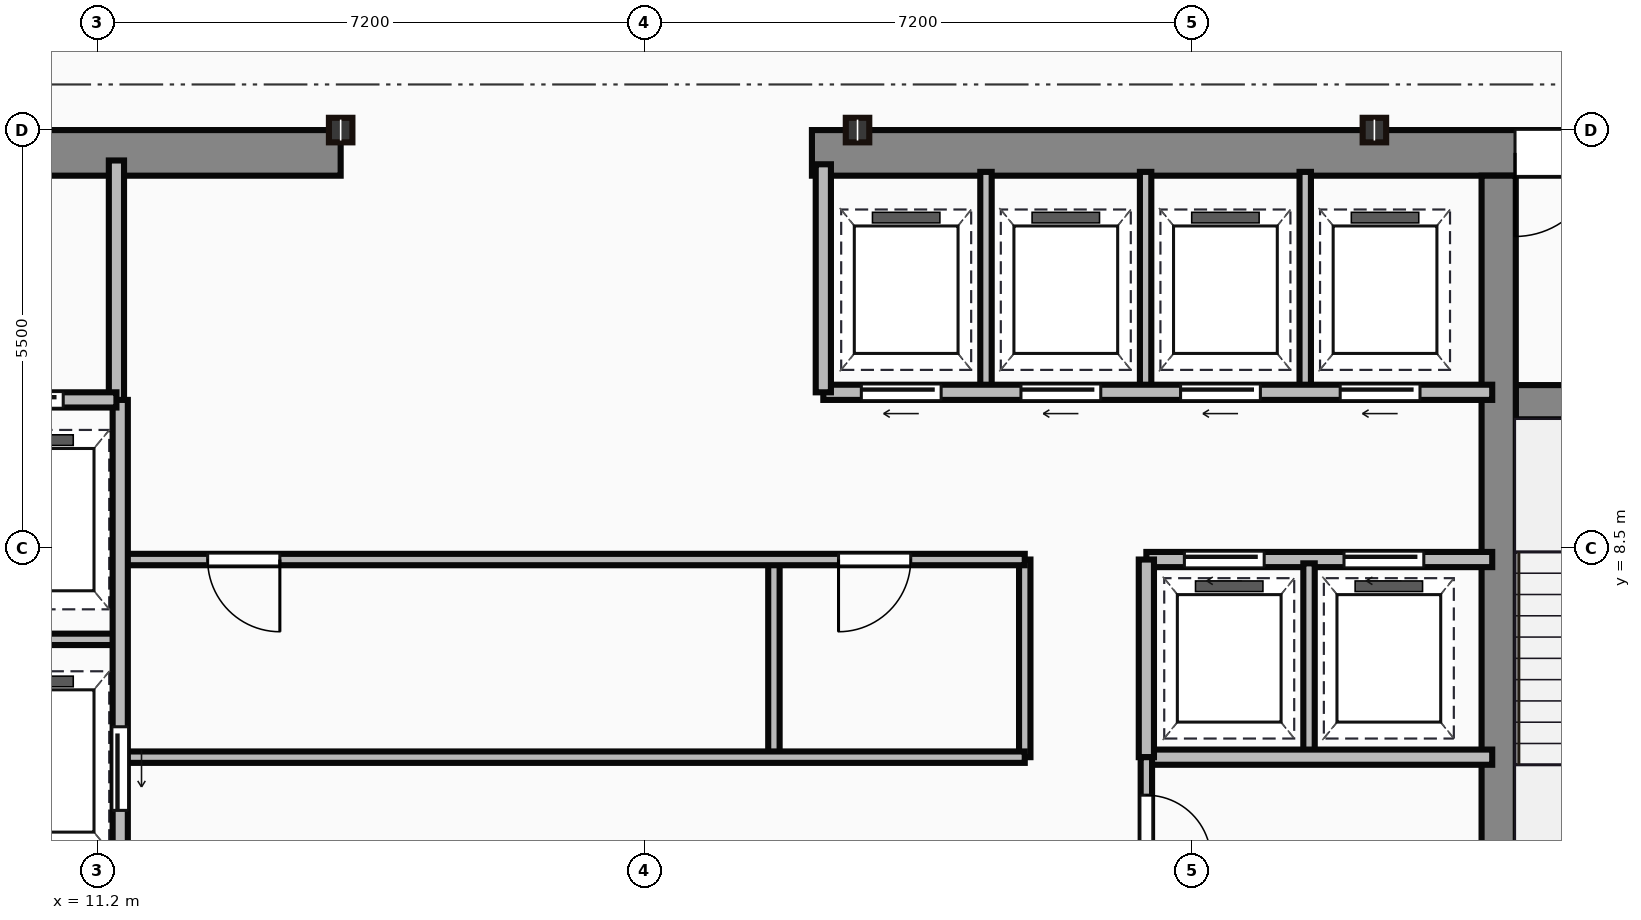
"""IFC4 building model, lengths in metres.
Left out: names, types, materials, properties, quantities, classifications, styles, units other than length and angle.
Written with IfcOpenShell. Run it as: python <this file> out.ifc"""

import sys

from ifc_helpers import new_model, si_unit, direction, frame, frame_2d, origin, origin_2d, place, context, subcontext, project, spatial, rectangle, i_section, extrude, source, transform, mapped, element, fill, save


model = new_model("IFC4")
c1 = context("Model", 3, precision=1e-05, world=origin(), true_north=direction((0.0, 1.0)))
c2 = subcontext(c1, "Body", "Model", "MODEL_VIEW")
j1 = project(units=[si_unit("LENGTHUNIT", "METRE"), si_unit("PLANEANGLEUNIT", "RADIAN")], contexts=[c1])
p1 = place(None, origin())
s1 = spatial("IfcSite", under=j1, at=p1, CompositionType="ELEMENT")
p2 = place(p1, origin())
s2 = spatial("IfcBuilding", under=s1, at=p2, CompositionType="ELEMENT")
p3 = place(p2, frame((0.0, 0.0, 273.4)))
s3 = spatial("IfcBuildingStorey", under=s2, at=p3, CompositionType="ELEMENT", Elevation=273.4)
m1 = source(origin(), c2, "Body", "SweptSolid", [
    extrude(rectangle(XDim=9.1, YDim=0.6, at=frame_2d((4.55, 0.0))), origin(), (0.0, 0.0, 1.0), 3.65),
])
p4 = place(p3, frame((5.3, 13.7, 0.0), z_axis=(0.0, 0.0, 1.0), x_axis=(1.0, 0.0, 0.0)))
e1 = element("IfcWall", 1, at=p4, inside=s3, PredefinedType="SHEAR", context=c2, shape_type="MappedRepresentation", body=[
    mapped(m1, transform((0.0, 0.0, 0.0))),
])
p5 = place(p4, frame((4.1, 0.0, 0.0)))
e2 = element("IfcOpeningElement", 2, at=p5, cuts=e1, PredefinedType="OPENING", context=c2, shape_type="SweptSolid", body=[
    extrude(rectangle(XDim=1.1, YDim=2.15, at=frame_2d((0.55, 1.075))), frame((0.0, 0.31, 0.0), z_axis=(0.0, -1.0, 0.0), x_axis=(1.0, 0.0, 0.0)), (0.0, 0.0, 1.0), 0.62),
])
m2 = source(origin(), c2, "Body", "SweptSolid", [
    extrude(rectangle(XDim=12.6, YDim=0.6, at=frame_2d((6.3, 0.0))), origin(), (0.0, 0.0, 1.0), 3.65),
])
p6 = place(p3, frame((20.6, 13.7, 0.0), z_axis=(0.0, 0.0, 1.0), x_axis=(1.0, 0.0, 0.0)))
e3 = element("IfcWall", 3, at=p6, inside=s3, PredefinedType="SHEAR", context=c2, shape_type="MappedRepresentation", body=[
    mapped(m2, transform((0.0, 0.0, 0.0))),
])
p7 = place(p6, frame((9.25, 0.0, 0.0)))
e4 = element("IfcOpeningElement", 4, at=p7, cuts=e3, PredefinedType="OPENING", context=c2, shape_type="SweptSolid", body=[
    extrude(rectangle(XDim=1.1, YDim=2.15, at=frame_2d((0.55, 1.075))), frame((0.0, 0.31, 0.0), z_axis=(0.0, -1.0, 0.0), x_axis=(1.0, 0.0, 0.0)), (0.0, 0.0, 1.0), 0.62),
])
m3 = source(origin(), c2, "Body", "SweptSolid", [
    extrude(rectangle(XDim=12.5, YDim=0.45, at=frame_2d((6.25, 0.0))), origin(), (0.0, 0.0, 1.0), 3.65),
])
p8 = place(p3, frame((29.635, 0.9, 0.0), z_axis=(0.0, 0.0, 1.0), x_axis=(0.0, 1.0, 0.0)))
e5 = element("IfcWall", 5, at=p8, inside=s3, PredefinedType="SHEAR", context=c2, shape_type="MappedRepresentation", body=[
    mapped(m3, transform((0.0, 0.0, 0.0))),
])
m4 = source(origin(), c2, "Body", "SweptSolid", [
    extrude(rectangle(XDim=3.39, YDim=0.45, at=frame_2d((1.695, 0.0))), origin(), (0.0, 0.0, 1.0), 3.65),
])
p9 = place(p3, frame((29.86, 10.42, 0.0), z_axis=(0.0, 0.0, 1.0), x_axis=(1.0, 0.0, 0.0)))
e6 = element("IfcWall", 6, at=p9, inside=s3, PredefinedType="SHEAR", context=c2, shape_type="MappedRepresentation", body=[
    mapped(m4, transform((0.0, 0.0, 0.0))),
])
p10 = place(p9, frame((1.1, 0.0, 0.0)))
e7 = element("IfcOpeningElement", 7, at=p10, cuts=e6, PredefinedType="OPENING", context=c2, shape_type="SweptSolid", body=[
    extrude(rectangle(XDim=1.1, YDim=2.15, at=frame_2d((0.55, 1.075))), frame((0.0, 0.235, 0.0), z_axis=(0.0, -1.0, 0.0), x_axis=(1.0, 0.0, 0.0)), (0.0, 0.0, 1.0), 0.47),
])
m5 = source(origin(), c2, "Body", "SweptSolid", [
    extrude(i_section(OverallWidth=0.309, OverallDepth=0.323, WebThickness=0.014, FlangeThickness=0.023, at=origin_2d()), origin(), (0.0, 0.0, 1.0), 3.65),
])
for number, where, z_axis, x_axis in (
    (8, (14.4, 14.0, 0.0), (0.0, 0.0, 1.0), (1.0, 0.0, 0.0)),
    (9, (21.2, 14.0, 0.0), (0.0, 0.0, 1.0), (1.0, 0.0, 0.0)),
    (10, (28.0, 14.0, 0.0), (0.0, 0.0, 1.0), (1.0, 0.0, 0.0)),
):
    element("IfcColumn", number, at=place(p3, frame(where, z_axis=z_axis, x_axis=x_axis)), inside=s3, PredefinedType="COLUMN", context=c2, shape_type="MappedRepresentation", body=[
        mapped(m5, transform((0.0, 0.0, 0.0))),
    ])
m6 = source(origin(), c2, "Body", "SweptSolid", [
    extrude(rectangle(XDim=3.18, YDim=0.2, at=frame_2d((1.59, 0.0))), origin(), (0.0, 0.0, 1.0), 3.4),
])
p11 = place(p3, frame((11.45, 10.42, 0.0), z_axis=(0.0, 0.0, 1.0), x_axis=(0.0, 1.0, 0.0)))
e11 = element("IfcWall", 11, at=p11, inside=s3, PredefinedType="PARTITIONING", context=c2, shape_type="MappedRepresentation", body=[
    mapped(m6, transform((0.0, 0.0, 0.0))),
])
m7 = source(origin(), c2, "Body", "SweptSolid", [
    extrude(rectangle(XDim=2.35, YDim=0.2, at=frame_2d((1.175, 0.0))), origin(), (0.0, 0.0, 1.0), 3.4),
])
p12 = place(p3, frame((9.1, 10.45, 0.0), z_axis=(0.0, 0.0, 1.0), x_axis=(1.0, 0.0, 0.0)))
e12 = element("IfcWall", 12, at=p12, inside=s3, PredefinedType="PARTITIONING", context=c2, shape_type="MappedRepresentation", body=[
    mapped(m7, transform((0.0, 0.0, 0.0))),
])
p13 = place(p12, frame((0.55, 0.0, 0.0)))
e13 = element("IfcOpeningElement", 13, at=p13, cuts=e12, PredefinedType="OPENING", context=c2, shape_type="SweptSolid", body=[
    extrude(rectangle(XDim=1.1, YDim=2.15, at=frame_2d((0.55, 1.075))), frame((0.0, 0.11, 0.0), z_axis=(0.0, -1.0, 0.0), x_axis=(1.0, 0.0, 0.0)), (0.0, 0.0, 1.0), 0.22),
])
m8 = source(origin(), c2, "Body", "SweptSolid", [
    extrude(rectangle(XDim=9.6, YDim=0.2, at=frame_2d((4.8, 0.0))), origin(), (0.0, 0.0, 1.0), 3.4),
])
p14 = place(p3, frame((11.5, 0.85, 0.0), z_axis=(0.0, 0.0, 1.0), x_axis=(0.0, 1.0, 0.0)))
e14 = element("IfcWall", 14, at=p14, inside=s3, PredefinedType="PARTITIONING", context=c2, shape_type="MappedRepresentation", body=[
    mapped(m8, transform((0.0, 0.0, 0.0))),
])
p15 = place(p14, frame((4.2, 0.0, 0.0)))
e15 = element("IfcOpeningElement", 15, at=p15, cuts=e14, PredefinedType="OPENING", context=c2, shape_type="SweptSolid", body=[
    extrude(rectangle(XDim=1.1, YDim=2.15, at=frame_2d((0.55, 1.075))), frame((0.0, 0.11, 0.0), z_axis=(0.0, -1.0, 0.0), x_axis=(1.0, 0.0, 0.0)), (0.0, 0.0, 1.0), 0.22),
])
p16 = place(p14, frame((0.9, 0.0, 0.0)))
e16 = element("IfcOpeningElement", 16, at=p16, cuts=e14, PredefinedType="OPENING", context=c2, shape_type="SweptSolid", body=[
    extrude(rectangle(XDim=1.2, YDim=2.15, at=frame_2d((0.6, 1.075))), frame((0.0, 0.11, 0.0), z_axis=(0.0, -1.0, 0.0), x_axis=(1.0, 0.0, 0.0)), (0.0, 0.0, 1.0), 0.22),
])
m9 = source(origin(), c2, "Body", "SweptSolid", [
    extrude(rectangle(XDim=2.4, YDim=0.15, at=frame_2d((1.2, 0.0))), origin(), (0.0, 0.0, 1.0), 3.4),
])
p17 = place(p3, frame((9.1, 7.3, 0.0), z_axis=(0.0, 0.0, 1.0), x_axis=(1.0, 0.0, 0.0)))
e17 = element("IfcWall", 17, at=p17, inside=s3, PredefinedType="PARTITIONING", context=c2, shape_type="MappedRepresentation", body=[
    mapped(m9, transform((0.0, 0.0, 0.0))),
])
m10 = source(origin(), c2, "Body", "SweptSolid", [
    extrude(rectangle(XDim=11.85, YDim=0.15, at=frame_2d((5.925, 0.0))), origin(), (0.0, 0.0, 1.0), 3.4),
])
p18 = place(p3, frame((11.55, 5.75, 0.0), z_axis=(0.0, 0.0, 1.0), x_axis=(1.0, 0.0, 0.0)))
e18 = element("IfcWall", 18, at=p18, inside=s3, PredefinedType="PARTITIONING", context=c2, shape_type="MappedRepresentation", body=[
    mapped(m10, transform((0.0, 0.0, 0.0))),
])
p19 = place(p3, frame((11.55, 8.35, 0.0), z_axis=(0.0, 0.0, 1.0), x_axis=(1.0, 0.0, 0.0)))
e19 = element("IfcWall", 19, at=p19, inside=s3, PredefinedType="PARTITIONING", context=c2, shape_type="MappedRepresentation", body=[
    mapped(m10, transform((0.0, 0.0, 0.0))),
])
p20 = place(p19, frame((1.1, 0.0, 0.0)))
e20 = element("IfcOpeningElement", 20, at=p20, cuts=e19, PredefinedType="OPENING", context=c2, shape_type="SweptSolid", body=[
    extrude(rectangle(XDim=0.95, YDim=2.15, at=frame_2d((0.475, 1.075))), frame((0.0, 0.085, 0.0), z_axis=(0.0, -1.0, 0.0), x_axis=(1.0, 0.0, 0.0)), (0.0, 0.0, 1.0), 0.17),
])
p21 = place(p19, frame((9.4, 0.0, 0.0)))
e21 = element("IfcOpeningElement", 21, at=p21, cuts=e19, PredefinedType="OPENING", context=c2, shape_type="SweptSolid", body=[
    extrude(rectangle(XDim=0.95, YDim=2.15, at=frame_2d((0.475, 1.075))), frame((0.0, 0.085, 0.0), z_axis=(0.0, -1.0, 0.0), x_axis=(1.0, 0.0, 0.0)), (0.0, 0.0, 1.0), 0.17),
])
m11 = source(origin(), c2, "Body", "SweptSolid", [
    extrude(rectangle(XDim=2.6, YDim=0.15, at=frame_2d((1.3, 0.0))), origin(), (0.0, 0.0, 1.0), 3.4),
])
p22 = place(p3, frame((23.4, 5.75, 0.0), z_axis=(0.0, 0.0, 1.0), x_axis=(0.0, 1.0, 0.0)))
e22 = element("IfcWall", 22, at=p22, inside=s3, PredefinedType="PARTITIONING", context=c2, shape_type="MappedRepresentation", body=[
    mapped(m11, transform((0.0, 0.0, 0.0))),
])
m12 = source(origin(), c2, "Body", "SweptSolid", [
    extrude(rectangle(XDim=2.5, YDim=0.15, at=frame_2d((1.25, 0.0))), origin(), (0.0, 0.0, 1.0), 3.4),
])
p23 = place(p3, frame((20.1, 5.8, 0.0), z_axis=(0.0, 0.0, 1.0), x_axis=(0.0, 1.0, 0.0)))
e23 = element("IfcWall", 23, at=p23, inside=s3, PredefinedType="PARTITIONING", context=c2, shape_type="MappedRepresentation", body=[
    mapped(m12, transform((0.0, 0.0, 0.0))),
])
m13 = source(origin(), c2, "Body", "SweptSolid", [
    extrude(rectangle(XDim=8.8, YDim=0.2, at=frame_2d((4.4, 0.0))), origin(), (0.0, 0.0, 1.0), 3.4),
])
p24 = place(p3, frame((20.75, 10.55, 0.0), z_axis=(0.0, 0.0, 1.0), x_axis=(1.0, 0.0, 0.0)))
e24 = element("IfcWall", 24, at=p24, inside=s3, PredefinedType="PARTITIONING", context=c2, shape_type="MappedRepresentation", body=[
    mapped(m13, transform((0.0, 0.0, 0.0))),
])
p25 = place(p24, frame((0.5, 0.0, 0.0)))
e25 = element("IfcOpeningElement", 25, at=p25, cuts=e24, PredefinedType="OPENING", context=c2, shape_type="SweptSolid", body=[
    extrude(rectangle(XDim=1.05, YDim=2.15, at=frame_2d((0.525, 1.075))), frame((0.0, 0.11, 0.0), z_axis=(0.0, -1.0, 0.0), x_axis=(1.0, 0.0, 0.0)), (0.0, 0.0, 1.0), 0.22),
])
p26 = place(p24, frame((2.6, 0.0, 0.0)))
e26 = element("IfcOpeningElement", 26, at=p26, cuts=e24, PredefinedType="OPENING", context=c2, shape_type="SweptSolid", body=[
    extrude(rectangle(XDim=1.05, YDim=2.15, at=frame_2d((0.525, 1.075))), frame((0.0, 0.11, 0.0), z_axis=(0.0, -1.0, 0.0), x_axis=(1.0, 0.0, 0.0)), (0.0, 0.0, 1.0), 0.22),
])
p27 = place(p24, frame((4.7, 0.0, 0.0)))
e27 = element("IfcOpeningElement", 27, at=p27, cuts=e24, PredefinedType="OPENING", context=c2, shape_type="SweptSolid", body=[
    extrude(rectangle(XDim=1.05, YDim=2.15, at=frame_2d((0.525, 1.075))), frame((0.0, 0.11, 0.0), z_axis=(0.0, -1.0, 0.0), x_axis=(1.0, 0.0, 0.0)), (0.0, 0.0, 1.0), 0.22),
])
p28 = place(p24, frame((6.8, 0.0, 0.0)))
e28 = element("IfcOpeningElement", 28, at=p28, cuts=e24, PredefinedType="OPENING", context=c2, shape_type="SweptSolid", body=[
    extrude(rectangle(XDim=1.05, YDim=2.15, at=frame_2d((0.525, 1.075))), frame((0.0, 0.11, 0.0), z_axis=(0.0, -1.0, 0.0), x_axis=(1.0, 0.0, 0.0)), (0.0, 0.0, 1.0), 0.22),
])
m14 = source(origin(), c2, "Body", "SweptSolid", [
    extrude(rectangle(XDim=3.0, YDim=0.2, at=frame_2d((1.5, 0.0))), origin(), (0.0, 0.0, 1.0), 3.4),
])
p29 = place(p3, frame((20.75, 10.55, 0.0), z_axis=(0.0, 0.0, 1.0), x_axis=(0.0, 1.0, 0.0)))
e29 = element("IfcWall", 29, at=p29, inside=s3, PredefinedType="PARTITIONING", context=c2, shape_type="MappedRepresentation", body=[
    mapped(m14, transform((0.0, 0.0, 0.0))),
])
m15 = source(origin(), c2, "Body", "SweptSolid", [
    extrude(rectangle(XDim=2.85, YDim=0.15, at=frame_2d((1.425, 0.0))), origin(), (0.0, 0.0, 1.0), 3.4),
])
for number, where, z_axis, x_axis in (
    (30, (22.89, 10.6, 0.0), (0.0, 0.0, 1.0), (0.0, 1.0, 0.0)),
    (31, (24.99, 10.6, 0.0), (0.0, 0.0, 1.0), (0.0, 1.0, 0.0)),
    (32, (27.09, 10.6, 0.0), (0.0, 0.0, 1.0), (0.0, 1.0, 0.0)),
):
    element("IfcWall", number, at=place(p3, frame(where, z_axis=z_axis, x_axis=x_axis)), inside=s3, PredefinedType="PARTITIONING", context=c2, shape_type="MappedRepresentation", body=[
        mapped(m15, transform((0.0, 0.0, 0.0))),
    ])
m16 = source(origin(), c2, "Body", "SweptSolid", [
    extrude(rectangle(XDim=4.55, YDim=0.2, at=frame_2d((2.275, 0.0))), origin(), (0.0, 0.0, 1.0), 3.4),
])
p30 = place(p3, frame((25.0, 8.35, 0.0), z_axis=(0.0, 0.0, 1.0), x_axis=(1.0, 0.0, 0.0)))
e33 = element("IfcWall", 33, at=p30, inside=s3, PredefinedType="PARTITIONING", context=c2, shape_type="MappedRepresentation", body=[
    mapped(m16, transform((0.0, 0.0, 0.0))),
])
p31 = place(p30, frame((0.5, 0.0, 0.0)))
e34 = element("IfcOpeningElement", 34, at=p31, cuts=e33, PredefinedType="OPENING", context=c2, shape_type="SweptSolid", body=[
    extrude(rectangle(XDim=1.05, YDim=2.15, at=frame_2d((0.525, 1.075))), frame((0.0, 0.11, 0.0), z_axis=(0.0, -1.0, 0.0), x_axis=(1.0, 0.0, 0.0)), (0.0, 0.0, 1.0), 0.22),
])
p32 = place(p30, frame((2.6, 0.0, 0.0)))
e35 = element("IfcOpeningElement", 35, at=p32, cuts=e33, PredefinedType="OPENING", context=c2, shape_type="SweptSolid", body=[
    extrude(rectangle(XDim=1.05, YDim=2.15, at=frame_2d((0.525, 1.075))), frame((0.0, 0.11, 0.0), z_axis=(0.0, -1.0, 0.0), x_axis=(1.0, 0.0, 0.0)), (0.0, 0.0, 1.0), 0.22),
])
p33 = place(p3, frame((25.0, 5.75, 0.0), z_axis=(0.0, 0.0, 1.0), x_axis=(1.0, 0.0, 0.0)))
e36 = element("IfcWall", 36, at=p33, inside=s3, PredefinedType="PARTITIONING", context=c2, shape_type="MappedRepresentation", body=[
    mapped(m16, transform((0.0, 0.0, 0.0))),
])
m17 = source(origin(), c2, "Body", "SweptSolid", [
    extrude(rectangle(XDim=2.6, YDim=0.2, at=frame_2d((1.3, 0.0))), origin(), (0.0, 0.0, 1.0), 3.4),
])
p34 = place(p3, frame((25.0, 5.75, 0.0), z_axis=(0.0, 0.0, 1.0), x_axis=(0.0, 1.0, 0.0)))
e37 = element("IfcWall", 37, at=p34, inside=s3, PredefinedType="PARTITIONING", context=c2, shape_type="MappedRepresentation", body=[
    mapped(m17, transform((0.0, 0.0, 0.0))),
])
p35 = place(p3, frame((27.14, 5.8, 0.0), z_axis=(0.0, 0.0, 1.0), x_axis=(0.0, 1.0, 0.0)))
e38 = element("IfcWall", 38, at=p35, inside=s3, PredefinedType="PARTITIONING", context=c2, shape_type="MappedRepresentation", body=[
    mapped(m12, transform((0.0, 0.0, 0.0))),
])
m18 = source(origin(), c2, "Body", "SweptSolid", [
    extrude(rectangle(XDim=4.9, YDim=0.15, at=frame_2d((2.45, 0.0))), origin(), (0.0, 0.0, 1.0), 3.4),
])
p36 = place(p3, frame((25.0, 0.85, 0.0), z_axis=(0.0, 0.0, 1.0), x_axis=(0.0, 1.0, 0.0)))
e39 = element("IfcWall", 39, at=p36, inside=s3, PredefinedType="PARTITIONING", context=c2, shape_type="MappedRepresentation", body=[
    mapped(m18, transform((0.0, 0.0, 0.0))),
])
p37 = place(p36, frame((1.85, 0.0, 0.0)))
e40 = element("IfcOpeningElement", 40, at=p37, cuts=e39, PredefinedType="OPENING", context=c2, shape_type="SweptSolid", body=[
    extrude(rectangle(XDim=0.95, YDim=2.15, at=frame_2d((0.475, 1.075))), frame((0.0, 0.085, 0.0), z_axis=(0.0, -1.0, 0.0), x_axis=(1.0, 0.0, 0.0)), (0.0, 0.0, 1.0), 0.17),
])
p38 = place(p36, frame((3.55, 0.0, 0.0)))
e41 = element("IfcOpeningElement", 41, at=p38, cuts=e39, PredefinedType="OPENING", context=c2, shape_type="SweptSolid", body=[
    extrude(rectangle(XDim=0.85, YDim=2.15, at=frame_2d((0.425, 1.075))), frame((0.0, 0.085, 0.0), z_axis=(0.0, -1.0, 0.0), x_axis=(1.0, 0.0, 0.0)), (0.0, 0.0, 1.0), 0.17),
])
m19 = source(origin(), c2, "Body", "SweptSolid", [
    extrude(rectangle(XDim=1.1, YDim=2.15, at=frame_2d((0.55, 1.075))), frame((0.0, 0.025, 0.0), z_axis=(0.0, -1.0, 0.0), x_axis=(1.0, 0.0, 0.0)), (0.0, 0.0, 1.0), 0.05),
])
p39 = place(p7, origin())
e42 = element("IfcDoor", 42, at=p39, inside=s3, OperationType="SINGLE_SWING_LEFT", PredefinedType="DOOR", context=c2, shape_type="MappedRepresentation", body=[
    mapped(m19, transform((0.0, 0.0, 0.0))),
])
fill(e4, e42)
p40 = place(p13, origin())
e43 = element("IfcDoor", 43, at=p40, inside=s3, OperationType="SLIDING_TO_LEFT", PredefinedType="DOOR", context=c2, shape_type="MappedRepresentation", body=[
    mapped(m19, transform((0.0, 0.0, 0.0))),
])
fill(e13, e43)
p41 = place(p15, frame((1.1, 0.0, 0.0), z_axis=(0.0, 0.0, 1.0), x_axis=(-1.0, 0.0, 0.0)))
e44 = element("IfcDoor", 44, at=p41, inside=s3, OperationType="SLIDING_TO_LEFT", PredefinedType="DOOR", context=c2, shape_type="MappedRepresentation", body=[
    mapped(m19, transform((0.0, 0.0, 0.0))),
])
fill(e15, e44)
m20 = source(origin(), c2, "Body", "SweptSolid", [
    extrude(rectangle(XDim=0.95, YDim=2.15, at=frame_2d((0.475, 1.075))), frame((0.0, 0.025, 0.0), z_axis=(0.0, -1.0, 0.0), x_axis=(1.0, 0.0, 0.0)), (0.0, 0.0, 1.0), 0.05),
])
p42 = place(p20, origin())
e45 = element("IfcDoor", 45, at=p42, inside=s3, OperationType="SINGLE_SWING_RIGHT", PredefinedType="DOOR", context=c2, shape_type="MappedRepresentation", body=[
    mapped(m20, transform((0.0, 0.0, 0.0))),
])
fill(e20, e45)
p43 = place(p21, origin())
e46 = element("IfcDoor", 46, at=p43, inside=s3, OperationType="SINGLE_SWING_LEFT", PredefinedType="DOOR", context=c2, shape_type="MappedRepresentation", body=[
    mapped(m20, transform((0.0, 0.0, 0.0))),
])
fill(e21, e46)
m21 = source(origin(), c2, "Body", "SweptSolid", [
    extrude(rectangle(XDim=1.05, YDim=2.15, at=frame_2d((0.525, 1.075))), frame((0.0, 0.025, 0.0), z_axis=(0.0, -1.0, 0.0), x_axis=(1.0, 0.0, 0.0)), (0.0, 0.0, 1.0), 0.05),
])
p44 = place(p25, frame((1.05, 0.0, 0.0), z_axis=(0.0, 0.0, 1.0), x_axis=(-1.0, 0.0, 0.0)))
e47 = element("IfcDoor", 47, at=p44, inside=s3, OperationType="SLIDING_TO_LEFT", PredefinedType="DOOR", context=c2, shape_type="MappedRepresentation", body=[
    mapped(m21, transform((0.0, 0.0, 0.0))),
])
fill(e25, e47)
p45 = place(p26, frame((1.05, 0.0, 0.0), z_axis=(0.0, 0.0, 1.0), x_axis=(-1.0, 0.0, 0.0)))
e48 = element("IfcDoor", 48, at=p45, inside=s3, OperationType="SLIDING_TO_LEFT", PredefinedType="DOOR", context=c2, shape_type="MappedRepresentation", body=[
    mapped(m21, transform((0.0, 0.0, 0.0))),
])
fill(e26, e48)
p46 = place(p27, frame((1.05, 0.0, 0.0), z_axis=(0.0, 0.0, 1.0), x_axis=(-1.0, 0.0, 0.0)))
e49 = element("IfcDoor", 49, at=p46, inside=s3, OperationType="SLIDING_TO_LEFT", PredefinedType="DOOR", context=c2, shape_type="MappedRepresentation", body=[
    mapped(m21, transform((0.0, 0.0, 0.0))),
])
fill(e27, e49)
p47 = place(p28, frame((1.05, 0.0, 0.0), z_axis=(0.0, 0.0, 1.0), x_axis=(-1.0, 0.0, 0.0)))
e50 = element("IfcDoor", 50, at=p47, inside=s3, OperationType="SLIDING_TO_LEFT", PredefinedType="DOOR", context=c2, shape_type="MappedRepresentation", body=[
    mapped(m21, transform((0.0, 0.0, 0.0))),
])
fill(e28, e50)
p48 = place(p31, origin())
e51 = element("IfcDoor", 51, at=p48, inside=s3, OperationType="SLIDING_TO_LEFT", PredefinedType="DOOR", context=c2, shape_type="MappedRepresentation", body=[
    mapped(m21, transform((0.0, 0.0, 0.0))),
])
fill(e34, e51)
p49 = place(p32, origin())
e52 = element("IfcDoor", 52, at=p49, inside=s3, OperationType="SLIDING_TO_LEFT", PredefinedType="DOOR", context=c2, shape_type="MappedRepresentation", body=[
    mapped(m21, transform((0.0, 0.0, 0.0))),
])
fill(e35, e52)
m22 = source(origin(), c2, "Body", "SweptSolid", [
    extrude(rectangle(XDim=0.85, YDim=2.15, at=frame_2d((0.425, 1.075))), frame((0.0, 0.025, 0.0), z_axis=(0.0, -1.0, 0.0), x_axis=(1.0, 0.0, 0.0)), (0.0, 0.0, 1.0), 0.05),
])
p50 = place(p38, origin())
e53 = element("IfcDoor", 53, at=p50, inside=s3, OperationType="SINGLE_SWING_LEFT", PredefinedType="DOOR", context=c2, shape_type="MappedRepresentation", body=[
    mapped(m22, transform((0.0, 0.0, 0.0))),
])
fill(e41, e53)
save(model, sys.argv[1])
